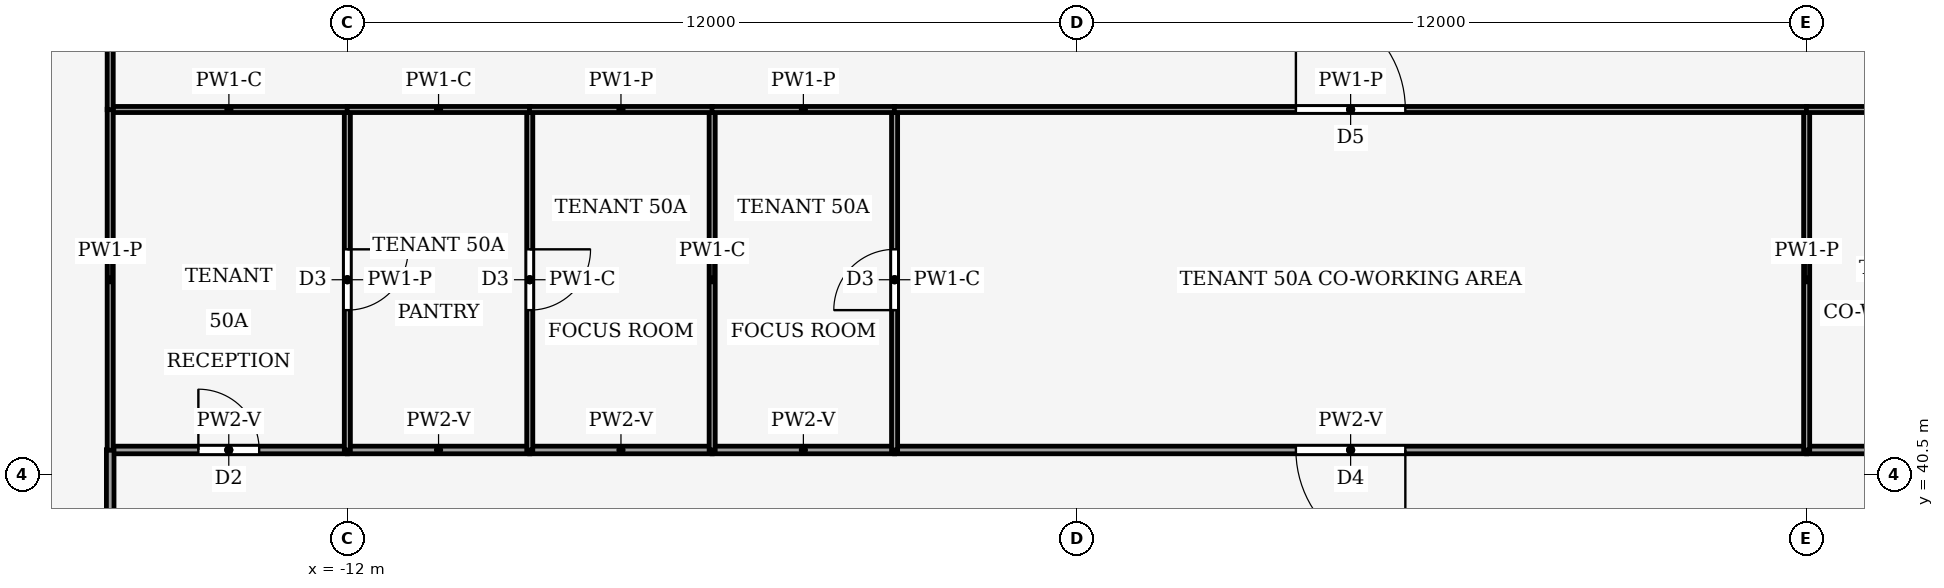
"""IFC4 building model, lengths in metres.
Left out: names, types, materials, properties, quantities, classifications, styles, units other than length and angle.
Written with IfcOpenShell. Run it as: python <this file> out.ifc"""

import sys

from ifc_helpers import new_model, si_unit, direction, frame, frame_2d, origin, place, context, subcontext, project, spatial, rectangle, extrude, element, fill, save


model = new_model("IFC4")
c1 = context("Model", 3, precision=1e-05, world=origin(), true_north=direction((0.0, 1.0)))
c2 = subcontext(c1, "Body", "Model", "MODEL_VIEW")
j1 = project(units=[si_unit("LENGTHUNIT", "METRE"), si_unit("PLANEANGLEUNIT", "RADIAN")], contexts=[c1])
p1 = place(None, origin())
s1 = spatial("IfcSite", under=j1, at=p1, CompositionType="ELEMENT")
p2 = place(p1, origin())
s2 = spatial("IfcBuilding", under=s1, at=p2, CompositionType="ELEMENT")
p3 = place(p2, frame((0.0, 0.0, 218.0)))
s3 = spatial("IfcBuildingStorey", under=s2, at=p3, CompositionType="ELEMENT", Elevation=218.0)
p4 = place(p3, frame((-15.9, 40.9, 0.0), z_axis=(0.0, 0.0, 1.0), x_axis=(1.0, 0.0, 0.0)))
e1 = element("IfcWall", 1, at=p4, inside=s3, PredefinedType="PARTITIONING", context=c2, shape_type="SweptSolid", body=[
    extrude(rectangle(XDim=3.9, YDim=0.125, at=frame_2d((1.95, 0.0))), origin(), (0.0, 0.0, 1.0), 3.44),
])
p5 = place(p4, frame((1.45, 0.0, 0.0)))
e2 = element("IfcOpeningElement", 2, at=p5, cuts=e1, PredefinedType="OPENING", context=c2, shape_type="SweptSolid", body=[
    extrude(rectangle(XDim=1.0, YDim=2.1, at=frame_2d((0.5, 1.05))), frame((0.0, 0.073, 0.0), z_axis=(0.0, -1.0, 0.0), x_axis=(1.0, 0.0, 0.0)), (0.0, 0.0, 1.0), 0.145),
])
for number, where, z_axis, x_axis in (
    (3, (-9.0, 40.9, 0.0), (0.0, 0.0, 1.0), (-1.0, 0.0, 0.0)),
    (4, (-6.0, 40.9, 0.0), (0.0, 0.0, 1.0), (-1.0, 0.0, 0.0)),
    (5, (-3.0, 40.9, 0.0), (0.0, 0.0, 1.0), (-1.0, 0.0, 0.0)),
):
    element("IfcWall", number, at=place(p3, frame(where, z_axis=z_axis, x_axis=x_axis)), inside=s3, PredefinedType="PARTITIONING", context=c2, shape_type="SweptSolid", body=[
        extrude(rectangle(XDim=3.0, YDim=0.125, at=frame_2d((1.5, 0.0))), origin(), (0.0, 0.0, 1.0), 3.44),
    ])
p6 = place(p3, frame((12.0, 40.9, 0.0), z_axis=(0.0, 0.0, 1.0), x_axis=(-1.0, 0.0, 0.0)))
e6 = element("IfcWall", 6, at=p6, inside=s3, PredefinedType="PARTITIONING", context=c2, shape_type="SweptSolid", body=[
    extrude(rectangle(XDim=15.0, YDim=0.125, at=frame_2d((7.5, 0.0))), origin(), (0.0, 0.0, 1.0), 3.44),
])
p7 = place(p6, frame((6.6, 0.0, 0.0)))
e7 = element("IfcOpeningElement", 7, at=p7, cuts=e6, PredefinedType="OPENING", context=c2, shape_type="SweptSolid", body=[
    extrude(rectangle(XDim=1.8, YDim=2.1, at=frame_2d((0.9, 1.05))), frame((0.0, 0.073, 0.0), z_axis=(0.0, -1.0, 0.0), x_axis=(1.0, 0.0, 0.0)), (0.0, 0.0, 1.0), 0.145),
])
p8 = place(p3, frame((12.0, 40.9, 0.0), z_axis=(0.0, 0.0, 1.0), x_axis=(1.0, 0.0, 0.0)))
e8 = element("IfcWall", 8, at=p8, inside=s3, PredefinedType="PARTITIONING", context=c2, shape_type="SweptSolid", body=[
    extrude(rectangle(XDim=3.9, YDim=0.125, at=frame_2d((1.95, 0.0))), origin(), (0.0, 0.0, 1.0), 3.44),
])
p9 = place(p8, frame((1.45, 0.0, 0.0)))
e9 = element("IfcOpeningElement", 9, at=p9, cuts=e8, PredefinedType="OPENING", context=c2, shape_type="SweptSolid", body=[
    extrude(rectangle(XDim=1.0, YDim=2.1, at=frame_2d((0.5, 1.05))), frame((0.0, 0.073, 0.0), z_axis=(0.0, -1.0, 0.0), x_axis=(1.0, 0.0, 0.0)), (0.0, 0.0, 1.0), 0.145),
])
p10 = place(p3, frame((-15.9, 34.5, 0.0), z_axis=(0.0, 0.0, 1.0), x_axis=(0.0, 1.0, 0.0)))
e10 = element("IfcWall", 10, at=p10, inside=s3, PredefinedType="PARTITIONING", context=c2, shape_type="SweptSolid", body=[
    extrude(rectangle(XDim=6.404, YDim=0.125, at=frame_2d((3.202, 0.0))), origin(), (0.0, 0.0, 1.0), 3.14),
])
p11 = place(p10, frame((2.702, 0.0, 0.0)))
e11 = element("IfcOpeningElement", 11, at=p11, cuts=e10, PredefinedType="OPENING", context=c2, shape_type="SweptSolid", body=[
    extrude(rectangle(XDim=1.0, YDim=2.1, at=frame_2d((0.5, 1.05))), frame((0.0, 0.073, 0.0), z_axis=(0.0, -1.0, 0.0), x_axis=(1.0, 0.0, 0.0)), (0.0, 0.0, 1.0), 0.145),
])
p12 = place(p3, frame((-12.0, 46.5, 0.0), z_axis=(0.0, 0.0, 1.0), x_axis=(0.0, -1.0, 0.0)))
e12 = element("IfcWall", 12, at=p12, inside=s3, PredefinedType="PARTITIONING", context=c2, shape_type="SweptSolid", body=[
    extrude(rectangle(XDim=5.6, YDim=0.1, at=frame_2d((2.8, 0.0))), origin(), (0.0, 0.0, 1.0), 3.44),
])
p13 = place(p12, frame((2.3, 0.0, 0.0)))
e13 = element("IfcOpeningElement", 13, at=p13, cuts=e12, PredefinedType="OPENING", context=c2, shape_type="SweptSolid", body=[
    extrude(rectangle(XDim=1.0, YDim=2.1, at=frame_2d((0.5, 1.05))), frame((0.0, 0.06, 0.0), z_axis=(0.0, -1.0, 0.0), x_axis=(1.0, 0.0, 0.0)), (0.0, 0.0, 1.0), 0.12),
])
p14 = place(p3, frame((-11.996, 46.5, 0.0), z_axis=(0.0, 0.0, 1.0), x_axis=(-1.0, 0.0, 0.0)))
e14 = element("IfcWall", 14, at=p14, inside=s3, PredefinedType="PARTITIONING", context=c2, shape_type="SweptSolid", body=[
    extrude(rectangle(XDim=3.904, YDim=0.1, at=frame_2d((1.952, 0.0))), origin(), (0.0, 0.0, 1.0), 3.87),
])
p15 = place(p3, frame((-15.9, 46.504, 0.0), z_axis=(0.0, 0.0, 1.0), x_axis=(0.0, -1.0, 0.0)))
e15 = element("IfcWall", 15, at=p15, inside=s3, PredefinedType="PARTITIONING", context=c2, shape_type="SweptSolid", body=[
    extrude(rectangle(XDim=5.608, YDim=0.1, at=frame_2d((2.804, 0.0))), origin(), (0.0, 0.0, 1.0), 3.44),
])
p16 = place(p3, frame((-9.0, 46.5, 0.0), z_axis=(0.0, 0.0, 1.0), x_axis=(0.0, -1.0, 0.0)))
e16 = element("IfcWall", 16, at=p16, inside=s3, PredefinedType="PARTITIONING", context=c2, shape_type="SweptSolid", body=[
    extrude(rectangle(XDim=5.6, YDim=0.1, at=frame_2d((2.8, 0.0))), origin(), (0.0, 0.0, 1.0), 3.87),
])
p17 = place(p16, frame((2.3, 0.0, 0.0)))
e17 = element("IfcOpeningElement", 17, at=p17, cuts=e16, PredefinedType="OPENING", context=c2, shape_type="SweptSolid", body=[
    extrude(rectangle(XDim=1.0, YDim=2.1, at=frame_2d((0.5, 1.05))), frame((0.0, 0.06, 0.0), z_axis=(0.0, -1.0, 0.0), x_axis=(1.0, 0.0, 0.0)), (0.0, 0.0, 1.0), 0.12),
])
p18 = place(p3, frame((-8.996, 46.5, 0.0), z_axis=(0.0, 0.0, 1.0), x_axis=(-1.0, 0.0, 0.0)))
e18 = element("IfcWall", 18, at=p18, inside=s3, PredefinedType="PARTITIONING", context=c2, shape_type="SweptSolid", body=[
    extrude(rectangle(XDim=3.008, YDim=0.1, at=frame_2d((1.504, 0.0))), origin(), (0.0, 0.0, 1.0), 3.87),
])
p19 = place(p3, frame((-6.0, 40.9, 0.0), z_axis=(0.0, 0.0, 1.0), x_axis=(0.0, 1.0, 0.0)))
e19 = element("IfcWall", 19, at=p19, inside=s3, PredefinedType="PARTITIONING", context=c2, shape_type="SweptSolid", body=[
    extrude(rectangle(XDim=5.6, YDim=0.1, at=frame_2d((2.8, 0.0))), origin(), (0.0, 0.0, 1.0), 3.87),
])
p20 = place(p3, frame((-5.996, 46.5, 0.0), z_axis=(0.0, 0.0, 1.0), x_axis=(-1.0, 0.0, 0.0)))
e20 = element("IfcWall", 20, at=p20, inside=s3, PredefinedType="PARTITIONING", context=c2, shape_type="SweptSolid", body=[
    extrude(rectangle(XDim=3.008, YDim=0.1, at=frame_2d((1.504, 0.0))), origin(), (0.0, 0.0, 1.0), 3.44),
])
p21 = place(p3, frame((-3.0, 40.9, 0.0), z_axis=(0.0, 0.0, 1.0), x_axis=(0.0, 1.0, 0.0)))
e21 = element("IfcWall", 21, at=p21, inside=s3, PredefinedType="PARTITIONING", context=c2, shape_type="SweptSolid", body=[
    extrude(rectangle(XDim=5.6, YDim=0.1, at=frame_2d((2.8, 0.0))), origin(), (0.0, 0.0, 1.0), 3.87),
])
p22 = place(p21, frame((2.3, 0.0, 0.0)))
e22 = element("IfcOpeningElement", 22, at=p22, cuts=e21, PredefinedType="OPENING", context=c2, shape_type="SweptSolid", body=[
    extrude(rectangle(XDim=1.0, YDim=2.1, at=frame_2d((0.5, 1.05))), frame((0.0, 0.06, 0.0), z_axis=(0.0, -1.0, 0.0), x_axis=(1.0, 0.0, 0.0)), (0.0, 0.0, 1.0), 0.12),
])
p23 = place(p3, frame((-2.996, 46.5, 0.0), z_axis=(0.0, 0.0, 1.0), x_axis=(-1.0, 0.0, 0.0)))
e23 = element("IfcWall", 23, at=p23, inside=s3, PredefinedType="PARTITIONING", context=c2, shape_type="SweptSolid", body=[
    extrude(rectangle(XDim=3.008, YDim=0.1, at=frame_2d((1.504, 0.0))), origin(), (0.0, 0.0, 1.0), 3.44),
])
p24 = place(p3, frame((12.0, 40.9, 0.0), z_axis=(0.0, 0.0, 1.0), x_axis=(0.0, 1.0, 0.0)))
e24 = element("IfcWall", 24, at=p24, inside=s3, PredefinedType="PARTITIONING", context=c2, shape_type="SweptSolid", body=[
    extrude(rectangle(XDim=5.6, YDim=0.1, at=frame_2d((2.8, 0.0))), origin(), (0.0, 0.0, 1.0), 3.44),
])
p25 = place(p3, frame((-3.004, 46.5, 0.0), z_axis=(0.0, 0.0, 1.0), x_axis=(1.0, 0.0, 0.0)))
e25 = element("IfcWall", 25, at=p25, inside=s3, PredefinedType="PARTITIONING", context=c2, shape_type="SweptSolid", body=[
    extrude(rectangle(XDim=15.008, YDim=0.1, at=frame_2d((7.504, 0.0))), origin(), (0.0, 0.0, 1.0), 3.44),
])
p26 = place(p25, frame((6.604, 0.0, 0.0)))
e26 = element("IfcOpeningElement", 26, at=p26, cuts=e25, PredefinedType="OPENING", context=c2, shape_type="SweptSolid", body=[
    extrude(rectangle(XDim=1.8, YDim=2.1, at=frame_2d((0.9, 1.05))), frame((0.0, 0.06, 0.0), z_axis=(0.0, -1.0, 0.0), x_axis=(1.0, 0.0, 0.0)), (0.0, 0.0, 1.0), 0.12),
])
p27 = place(p3, frame((15.9, 46.5, 0.0), z_axis=(0.0, 0.0, 1.0), x_axis=(-1.0, 0.0, 0.0)))
e27 = element("IfcWall", 27, at=p27, inside=s3, PredefinedType="PARTITIONING", context=c2, shape_type="SweptSolid", body=[
    extrude(rectangle(XDim=3.904, YDim=0.1, at=frame_2d((1.952, 0.0))), origin(), (0.0, 0.0, 1.0), 3.87),
])
p28 = place(p3, frame((-15.9, 61.504, 0.0), z_axis=(0.0, 0.0, 1.0), x_axis=(0.0, -1.0, 0.0)))
e28 = element("IfcWall", 28, at=p28, inside=s3, PredefinedType="PARTITIONING", context=c2, shape_type="SweptSolid", body=[
    extrude(rectangle(XDim=15.008, YDim=0.1, at=frame_2d((7.504, 0.0))), origin(), (0.0, 0.0, 1.0), 3.24),
])
p29 = place(p5, origin())
e29 = element("IfcDoor", 29, at=p29, inside=s3, OperationType="SINGLE_SWING_LEFT", PredefinedType="DOOR", context=c2, shape_type="SweptSolid", body=[
    extrude(rectangle(XDim=1.0, YDim=2.1, at=frame_2d((0.5, 1.05))), frame((0.0, 0.025, 0.0), z_axis=(0.0, -1.0, 0.0), x_axis=(1.0, 0.0, 0.0)), (0.0, 0.0, 1.0), 0.05),
])
fill(e2, e29)
p30 = place(p7, origin())
e30 = element("IfcDoor", 30, at=p30, inside=s3, OperationType="DOUBLE_DOOR_SINGLE_SWING", PredefinedType="DOOR", context=c2, shape_type="SweptSolid", body=[
    extrude(rectangle(XDim=1.8, YDim=2.1, at=frame_2d((0.9, 1.05))), frame((0.0, 0.025, 0.0), z_axis=(0.0, -1.0, 0.0), x_axis=(1.0, 0.0, 0.0)), (0.0, 0.0, 1.0), 0.05),
])
fill(e7, e30)
p31 = place(p13, origin())
e31 = element("IfcDoor", 31, at=p31, inside=s3, OperationType="SINGLE_SWING_LEFT", PredefinedType="DOOR", context=c2, shape_type="SweptSolid", body=[
    extrude(rectangle(XDim=1.0, YDim=2.1, at=frame_2d((0.5, 1.05))), frame((0.0, 0.025, 0.0), z_axis=(0.0, -1.0, 0.0), x_axis=(1.0, 0.0, 0.0)), (0.0, 0.0, 1.0), 0.05),
])
fill(e13, e31)
p32 = place(p17, origin())
e32 = element("IfcDoor", 32, at=p32, inside=s3, OperationType="SINGLE_SWING_RIGHT", PredefinedType="DOOR", context=c2, shape_type="SweptSolid", body=[
    extrude(rectangle(XDim=1.0, YDim=2.1, at=frame_2d((0.5, 1.05))), frame((0.0, 0.025, 0.0), z_axis=(0.0, -1.0, 0.0), x_axis=(1.0, 0.0, 0.0)), (0.0, 0.0, 1.0), 0.05),
])
fill(e17, e32)
p33 = place(p22, origin())
e33 = element("IfcDoor", 33, at=p33, inside=s3, OperationType="SINGLE_SWING_LEFT", PredefinedType="DOOR", context=c2, shape_type="SweptSolid", body=[
    extrude(rectangle(XDim=1.0, YDim=2.1, at=frame_2d((0.5, 1.05))), frame((0.0, 0.025, 0.0), z_axis=(0.0, -1.0, 0.0), x_axis=(1.0, 0.0, 0.0)), (0.0, 0.0, 1.0), 0.05),
])
fill(e22, e33)
p34 = place(p26, origin())
e34 = element("IfcDoor", 34, at=p34, inside=s3, OperationType="DOUBLE_DOOR_SINGLE_SWING", PredefinedType="DOOR", context=c2, shape_type="SweptSolid", body=[
    extrude(rectangle(XDim=1.8, YDim=2.1, at=frame_2d((0.9, 1.05))), frame((0.0, 0.025, 0.0), z_axis=(0.0, -1.0, 0.0), x_axis=(1.0, 0.0, 0.0)), (0.0, 0.0, 1.0), 0.05),
])
fill(e26, e34)
save(model, sys.argv[1])
